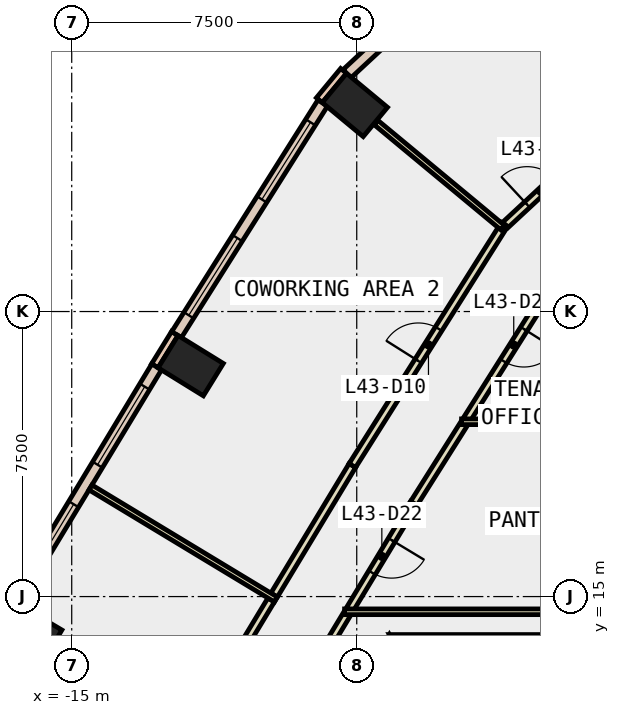
"""IFC4 building model, lengths in metres.
Left out: names, types, materials, properties, quantities, classifications, styles, units other than length and angle.
Written with IfcOpenShell. Run it as: python <this file> out.ifc"""

import sys

from ifc_helpers import new_model, si_unit, direction, frame, frame_2d, origin, origin_2d, place, context, subcontext, project, spatial, polyline, rectangle, outline, extrude, element, fill, save


model = new_model("IFC4")
c1 = context("Model", 3, precision=1e-05, world=origin(), true_north=direction((0.0, 1.0)))
c2 = subcontext(c1, "Body", "Model", "MODEL_VIEW")
j1 = project(units=[si_unit("LENGTHUNIT", "METRE"), si_unit("PLANEANGLEUNIT", "RADIAN")], contexts=[c1])
p1 = place(None, origin())
s1 = spatial("IfcSite", under=j1, at=p1, CompositionType="ELEMENT")
p2 = place(p1, origin())
s2 = spatial("IfcBuilding", under=s1, at=p2, CompositionType="ELEMENT")
p3 = place(p2, frame((0.0, 0.0, 194.0)))
s3 = spatial("IfcBuildingStorey", under=s2, at=p3, CompositionType="ELEMENT", Elevation=194.0)
for number, where, z_axis, x_axis in (
    (1, (-7.549, 27.935, -0.4), (0.0, 0.0, 1.0), (0.639, 0.769, 0.0)),
    (2, (-11.869, 21.076, -0.4), (0.0, 0.0, 1.0), (0.525, 0.851, 0.0)),
    (3, (-16.116, 14.046, -0.4), (0.0, 0.0, 1.0), (0.509, 0.861, 0.0)),
):
    element("IfcColumn", number, at=place(p3, frame(where, z_axis=z_axis, x_axis=x_axis)), inside=s3, PredefinedType="COLUMN", context=c2, shape_type="SweptSolid", body=[
        extrude(rectangle(XDim=1.0, YDim=1.4, at=origin_2d()), origin(), (0.0, 0.0, 1.0), 4.2),
    ])
p4 = place(p3, frame((0.0, 0.0, -0.4)))
e4 = element("IfcWall", 4, at=p4, inside=s3, PredefinedType="SHEAR", context=c2, shape_type="SweptSolid", body=[
    extrude(outline(polyline([(6.64, 14.0), (-6.64, 14.0), (-6.235, 13.3), (6.235, 13.3), (6.64, 14.0)])), origin(), (0.0, 0.0, 1.0), 4.2),
])
p5 = place(p3, frame((0.0, 0.0, -0.4)))
e5 = element("IfcWall", 5, at=p5, inside=s3, PredefinedType="SHEAR", context=c2, shape_type="SweptSolid", body=[
    extrude(outline(polyline([(-11.834, 5.002), (-11.228, 4.652), (-6.235, 13.3), (-6.64, 14.0), (-11.834, 5.002)])), origin(), (0.0, 0.0, 1.0), 4.2),
])
p6 = place(p3, frame((-7.846, 28.831, 0.0), z_axis=(0.0, 0.0, 1.0), x_axis=(-0.637972365578, -0.770059257953, 0.0)))
e6 = element("IfcWall", 6, at=p6, inside=s3, PredefinedType="STANDARD", context=c2, shape_type="SweptSolid", body=[
    extrude(rectangle(XDim=1.0, YDim=0.2, at=frame_2d((0.5, 0.0))), origin(), (0.0, 0.0, 1.0), 3.8),
])
p7 = place(p3, frame((-12.287, 21.922, 0.0), z_axis=(0.0, 0.0, 1.0), x_axis=(-0.525648735675, -0.850701714282, 0.0)))
e7 = element("IfcWall", 7, at=p7, inside=s3, PredefinedType="STANDARD", context=c2, shape_type="SweptSolid", body=[
    extrude(rectangle(XDim=1.0, YDim=0.2, at=frame_2d((0.5, 0.0))), origin(), (0.0, 0.0, 1.0), 3.8),
])
p8 = place(p3, frame((-4.996, 31.319, 0.0), z_axis=(0.0, 0.0, 1.0), x_axis=(-0.732897351132, -0.680339233547, 0.0)))
e8 = element("IfcWall", 8, at=p8, inside=s3, PredefinedType="STANDARD", context=c2, shape_type="SweptSolid", body=[
    extrude(rectangle(XDim=3.767, YDim=0.3, at=frame_2d((1.884, 0.0))), origin(), (0.0, 0.0, 1.0), 3.8),
])
p9 = place(p8, frame((1.184, 0.0, 0.9)))
e9 = element("IfcOpeningElement", 9, at=p9, cuts=e8, PredefinedType="OPENING", context=c2, shape_type="SweptSolid", body=[
    extrude(rectangle(XDim=1.4, YDim=2.6, at=frame_2d((0.7, 1.3))), frame((0.0, 0.16, 0.0), z_axis=(0.0, -1.0, 0.0), x_axis=(1.0, 0.0, 0.0)), (0.0, 0.0, 1.0), 0.32),
])
p10 = place(p3, frame((-8.394, 27.988, 0.0), z_axis=(0.0, 0.0, 1.0), x_axis=(-0.533680752529, -0.845686025887, 0.0)))
e10 = element("IfcWall", 10, at=p10, inside=s3, PredefinedType="STANDARD", context=c2, shape_type="SweptSolid", body=[
    extrude(rectangle(XDim=7.208, YDim=0.3, at=frame_2d((3.604, 0.0))), origin(), (0.0, 0.0, 1.0), 3.8),
])
p11 = place(p10, frame((0.602, 0.0, 0.9)))
e11 = element("IfcOpeningElement", 11, at=p11, cuts=e10, PredefinedType="OPENING", context=c2, shape_type="SweptSolid", body=[
    extrude(rectangle(XDim=2.4, YDim=2.6, at=frame_2d((1.2, 1.3))), frame((0.0, 0.16, 0.0), z_axis=(0.0, -1.0, 0.0), x_axis=(1.0, 0.0, 0.0)), (0.0, 0.0, 1.0), 0.32),
])
p12 = place(p10, frame((4.206, 0.0, 0.9)))
e12 = element("IfcOpeningElement", 12, at=p12, cuts=e10, PredefinedType="OPENING", context=c2, shape_type="SweptSolid", body=[
    extrude(rectangle(XDim=2.4, YDim=2.6, at=frame_2d((1.2, 1.3))), frame((0.0, 0.16, 0.0), z_axis=(0.0, -1.0, 0.0), x_axis=(1.0, 0.0, 0.0)), (0.0, 0.0, 1.0), 0.32),
])
p13 = place(p3, frame((-12.765, 21.043, 0.0), z_axis=(0.0, 0.0, 1.0), x_axis=(-0.517159962006, -0.855888762456, 0.0)))
e13 = element("IfcWall", 13, at=p13, inside=s3, PredefinedType="STANDARD", context=c2, shape_type="SweptSolid", body=[
    extrude(rectangle(XDim=7.23, YDim=0.3, at=frame_2d((3.615, 0.0))), origin(), (0.0, 0.0, 1.0), 3.8),
])
p14 = place(p13, frame((0.607, 0.0, 0.9)))
e14 = element("IfcOpeningElement", 14, at=p14, cuts=e13, PredefinedType="OPENING", context=c2, shape_type="SweptSolid", body=[
    extrude(rectangle(XDim=2.4, YDim=2.6, at=frame_2d((1.2, 1.3))), frame((0.0, 0.16, 0.0), z_axis=(0.0, -1.0, 0.0), x_axis=(1.0, 0.0, 0.0)), (0.0, 0.0, 1.0), 0.32),
])
p15 = place(p13, frame((4.222, 0.0, 0.9)))
e15 = element("IfcOpeningElement", 15, at=p15, cuts=e13, PredefinedType="OPENING", context=c2, shape_type="SweptSolid", body=[
    extrude(rectangle(XDim=2.4, YDim=2.6, at=frame_2d((1.2, 1.3))), frame((0.0, 0.16, 0.0), z_axis=(0.0, -1.0, 0.0), x_axis=(1.0, 0.0, 0.0)), (0.0, 0.0, 1.0), 0.32),
])
p16 = place(p3, frame((-7.759, 14.536, 0.0), z_axis=(0.0, 0.0, 1.0), x_axis=(-0.516926279395, -0.856029918678, 0.0)))
e16 = element("IfcWall", 16, at=p16, inside=s3, PredefinedType="PARTITIONING", context=c2, shape_type="SweptSolid", body=[
    extrude(rectangle(XDim=3.188, YDim=0.2, at=frame_2d((1.594, 0.0))), origin(), (0.0, 0.0, 1.0), 3.8),
])
p17 = place(p16, frame((1.094, 0.0, 0.0)))
e17 = element("IfcOpeningElement", 17, at=p17, cuts=e16, PredefinedType="OPENING", context=c2, shape_type="SweptSolid", body=[
    extrude(rectangle(XDim=1.0, YDim=2.1, at=frame_2d((0.5, 1.05))), frame((0.0, 0.11, 0.0), z_axis=(0.0, -1.0, 0.0), x_axis=(1.0, 0.0, 0.0)), (0.0, 0.0, 1.0), 0.22),
])
p18 = place(p3, frame((-4.682, 19.537, 0.0), z_axis=(0.0, 0.0, 1.0), x_axis=(-0.533579580306, -0.845749863423, 0.0)))
e18 = element("IfcWall", 18, at=p18, inside=s3, PredefinedType="PARTITIONING", context=c2, shape_type="SweptSolid", body=[
    extrude(rectangle(XDim=2.467, YDim=0.2, at=frame_2d((1.233, 0.0))), origin(), (0.0, 0.0, 1.0), 3.8),
])
p19 = place(p3, frame((-5.998, 17.451, 0.0), z_axis=(0.0, 0.0, 1.0), x_axis=(-0.516919907997, -0.856033766108, 0.0)))
e19 = element("IfcWall", 19, at=p19, inside=s3, PredefinedType="PARTITIONING", context=c2, shape_type="SweptSolid", body=[
    extrude(rectangle(XDim=3.256, YDim=0.2, at=frame_2d((1.628, 0.0))), origin(), (0.0, 0.0, 1.0), 3.8),
])
p20 = place(p19, frame((1.128, 0.0, 0.0)))
e20 = element("IfcOpeningElement", 20, at=p20, cuts=e19, PredefinedType="OPENING", context=c2, shape_type="SweptSolid", body=[
    extrude(rectangle(XDim=1.0, YDim=2.1, at=frame_2d((0.5, 1.05))), frame((0.0, 0.11, 0.0), z_axis=(0.0, -1.0, 0.0), x_axis=(1.0, 0.0, 0.0)), (0.0, 0.0, 1.0), 0.22),
])
p21 = place(p3, frame((-2.136, 23.571, 0.0), z_axis=(0.0, 0.0, 1.0), x_axis=(-0.533664968846, -0.845695986171, 0.0)))
e21 = element("IfcWall", 21, at=p21, inside=s3, PredefinedType="PARTITIONING", context=c2, shape_type="SweptSolid", body=[
    extrude(rectangle(XDim=4.621, YDim=0.2, at=frame_2d((2.311, 0.0))), origin(), (0.0, 0.0, 1.0), 3.8),
])
p22 = place(p21, frame((1.81, 0.0, 0.0)))
e22 = element("IfcOpeningElement", 22, at=p22, cuts=e21, PredefinedType="OPENING", context=c2, shape_type="SweptSolid", body=[
    extrude(rectangle(XDim=1.0, YDim=2.1, at=frame_2d((0.5, 1.05))), frame((0.0, 0.11, 0.0), z_axis=(0.0, -1.0, 0.0), x_axis=(1.0, 0.0, 0.0)), (0.0, 0.0, 1.0), 0.22),
])
p23 = place(p3, frame((-3.59, 24.778, 0.0), z_axis=(0.0, 0.0, 1.0), x_axis=(0.732939008525, 0.680294355248, 0.0)))
e23 = element("IfcWall", 23, at=p23, inside=s3, PredefinedType="PARTITIONING", context=c2, shape_type="SweptSolid", body=[
    extrude(rectangle(XDim=2.569, YDim=0.2, at=frame_2d((1.285, 0.0))), origin(), (0.0, 0.0, 1.0), 3.8),
])
p24 = place(p23, frame((0.785, 0.0, 0.0)))
e24 = element("IfcOpeningElement", 24, at=p24, cuts=e23, PredefinedType="OPENING", context=c2, shape_type="SweptSolid", body=[
    extrude(rectangle(XDim=1.0, YDim=2.1, at=frame_2d((0.5, 1.05))), frame((0.0, 0.11, 0.0), z_axis=(0.0, -1.0, 0.0), x_axis=(1.0, 0.0, 0.0)), (0.0, 0.0, 1.0), 0.22),
])
p25 = place(p3, frame((-9.674, 15.039, 0.0), z_axis=(0.0, 0.0, 1.0), x_axis=(0.516918251554, 0.856034766356, 0.0)))
e25 = element("IfcWall", 25, at=p25, inside=s3, PredefinedType="PARTITIONING", context=c2, shape_type="SweptSolid", body=[
    extrude(rectangle(XDim=3.983, YDim=0.2, at=frame_2d((1.992, 0.0))), origin(), (0.0, 0.0, 1.0), 3.8),
])
p26 = place(p3, frame((-7.615, 18.449, 0.0), z_axis=(0.0, 0.0, 1.0), x_axis=(0.533699180497, 0.845674396406, 0.0)))
e26 = element("IfcWall", 26, at=p26, inside=s3, PredefinedType="PARTITIONING", context=c2, shape_type="SweptSolid", body=[
    extrude(rectangle(XDim=7.504, YDim=0.2, at=frame_2d((3.752, 0.0))), origin(), (0.0, 0.0, 1.0), 3.8),
])
p27 = place(p26, frame((3.252, 0.0, 0.0)))
e27 = element("IfcOpeningElement", 27, at=p27, cuts=e26, PredefinedType="OPENING", context=c2, shape_type="SweptSolid", body=[
    extrude(rectangle(XDim=1.0, YDim=2.1, at=frame_2d((0.5, 1.05))), frame((0.0, 0.11, 0.0), z_axis=(0.0, -1.0, 0.0), x_axis=(1.0, 0.0, 0.0)), (0.0, 0.0, 1.0), 0.22),
])
p28 = place(p3, frame((-11.811, 11.503, 0.0), z_axis=(0.0, 0.0, 1.0), x_axis=(0.517135291957, 0.855903668535, 0.0)))
e28 = element("IfcWall", 28, at=p28, inside=s3, PredefinedType="PARTITIONING", context=c2, shape_type="SweptSolid", body=[
    extrude(rectangle(XDim=3.982, YDim=0.2, at=frame_2d((1.991, 0.0))), origin(), (0.0, 0.0, 1.0), 3.8),
])
p29 = place(p3, frame((-0.4, 14.6, 0.0), z_axis=(0.0, 0.0, 1.0), x_axis=(-1.0, 0.0, 0.0)))
e29 = element("IfcWall", 29, at=p29, inside=s3, PredefinedType="PARTITIONING", context=c2, shape_type="SweptSolid", body=[
    extrude(rectangle(XDim=7.42, YDim=0.15, at=frame_2d((3.71, 0.0))), origin(), (0.0, 0.0, 1.0), 3.8),
])
p30 = place(p3, frame((-4.742, 19.6, 0.0), z_axis=(0.0, 0.0, 1.0), x_axis=(1.0, 0.0, 0.0)))
e30 = element("IfcWall", 30, at=p30, inside=s3, PredefinedType="PARTITIONING", context=c2, shape_type="SweptSolid", body=[
    extrude(rectangle(XDim=4.342, YDim=0.15, at=frame_2d((2.171, 0.0))), origin(), (0.0, 0.0, 1.0), 3.8),
])
p31 = place(p3, frame((-3.663, 24.71, 0.0), z_axis=(0.0, 0.0, 1.0), x_axis=(-0.76953221629, 0.638607992505, 0.0)))
e31 = element("IfcWall", 31, at=p31, inside=s3, PredefinedType="PARTITIONING", context=c2, shape_type="SweptSolid", body=[
    extrude(rectangle(XDim=4.33, YDim=0.15, at=frame_2d((2.165, 0.0))), origin(), (0.0, 0.0, 1.0), 3.8),
])
p32 = place(p3, frame((-9.628, 14.924, 0.0), z_axis=(0.0, 0.0, 1.0), x_axis=(-0.855931736607, 0.517088834021, 0.0)))
e32 = element("IfcWall", 32, at=p32, inside=s3, PredefinedType="PARTITIONING", context=c2, shape_type="SweptSolid", body=[
    extrude(rectangle(XDim=5.699, YDim=0.15, at=frame_2d((2.85, 0.0))), origin(), (0.0, 0.0, 1.0), 3.8),
])
p33 = place(p11, origin())
e33 = element("IfcWindow", 33, at=p33, inside=s3, PartitioningType="SINGLE_PANEL", PredefinedType="WINDOW", context=c2, shape_type="SweptSolid", body=[
    extrude(rectangle(XDim=2.4, YDim=2.6, at=frame_2d((1.2, 1.3))), frame((0.0, 0.03, 0.0), z_axis=(0.0, -1.0, 0.0), x_axis=(1.0, 0.0, 0.0)), (0.0, 0.0, 1.0), 0.06),
])
fill(e11, e33)
p34 = place(p12, origin())
e34 = element("IfcWindow", 34, at=p34, inside=s3, PartitioningType="SINGLE_PANEL", PredefinedType="WINDOW", context=c2, shape_type="SweptSolid", body=[
    extrude(rectangle(XDim=2.4, YDim=2.6, at=frame_2d((1.2, 1.3))), frame((0.0, 0.03, 0.0), z_axis=(0.0, -1.0, 0.0), x_axis=(1.0, 0.0, 0.0)), (0.0, 0.0, 1.0), 0.06),
])
fill(e12, e34)
p35 = place(p14, origin())
e35 = element("IfcWindow", 35, at=p35, inside=s3, PartitioningType="SINGLE_PANEL", PredefinedType="WINDOW", context=c2, shape_type="SweptSolid", body=[
    extrude(rectangle(XDim=2.4, YDim=2.6, at=frame_2d((1.2, 1.3))), frame((0.0, 0.03, 0.0), z_axis=(0.0, -1.0, 0.0), x_axis=(1.0, 0.0, 0.0)), (0.0, 0.0, 1.0), 0.06),
])
fill(e14, e35)
p36 = place(p15, origin())
e36 = element("IfcWindow", 36, at=p36, inside=s3, PartitioningType="SINGLE_PANEL", PredefinedType="WINDOW", context=c2, shape_type="SweptSolid", body=[
    extrude(rectangle(XDim=2.4, YDim=2.6, at=frame_2d((1.2, 1.3))), frame((0.0, 0.03, 0.0), z_axis=(0.0, -1.0, 0.0), x_axis=(1.0, 0.0, 0.0)), (0.0, 0.0, 1.0), 0.06),
])
fill(e15, e36)
p37 = place(p24, origin())
e37 = element("IfcDoor", 37, at=p37, inside=s3, OperationType="SINGLE_SWING_LEFT", PredefinedType="DOOR", context=c2, shape_type="SweptSolid", body=[
    extrude(rectangle(XDim=1.0, YDim=2.1, at=frame_2d((0.5, 1.05))), frame((0.0, 0.025, 0.0), z_axis=(0.0, -1.0, 0.0), x_axis=(1.0, 0.0, 0.0)), (0.0, 0.0, 1.0), 0.05),
])
fill(e24, e37)
p38 = place(p27, origin())
e38 = element("IfcDoor", 38, at=p38, inside=s3, OperationType="SINGLE_SWING_RIGHT", PredefinedType="DOOR", context=c2, shape_type="SweptSolid", body=[
    extrude(rectangle(XDim=1.0, YDim=2.1, at=frame_2d((0.5, 1.05))), frame((0.0, 0.025, 0.0), z_axis=(0.0, -1.0, 0.0), x_axis=(1.0, 0.0, 0.0)), (0.0, 0.0, 1.0), 0.05),
])
fill(e27, e38)
p39 = place(p20, origin())
e39 = element("IfcDoor", 39, at=p39, inside=s3, OperationType="SINGLE_SWING_RIGHT", PredefinedType="DOOR", context=c2, shape_type="SweptSolid", body=[
    extrude(rectangle(XDim=1.0, YDim=2.1, at=frame_2d((0.5, 1.05))), frame((0.0, 0.025, 0.0), z_axis=(0.0, -1.0, 0.0), x_axis=(1.0, 0.0, 0.0)), (0.0, 0.0, 1.0), 0.05),
])
fill(e20, e39)
p40 = place(p22, origin())
e40 = element("IfcDoor", 40, at=p40, inside=s3, OperationType="SINGLE_SWING_LEFT", PredefinedType="DOOR", context=c2, shape_type="SweptSolid", body=[
    extrude(rectangle(XDim=1.0, YDim=2.1, at=frame_2d((0.5, 1.05))), frame((0.0, 0.025, 0.0), z_axis=(0.0, -1.0, 0.0), x_axis=(1.0, 0.0, 0.0)), (0.0, 0.0, 1.0), 0.05),
])
fill(e22, e40)
save(model, sys.argv[1])
